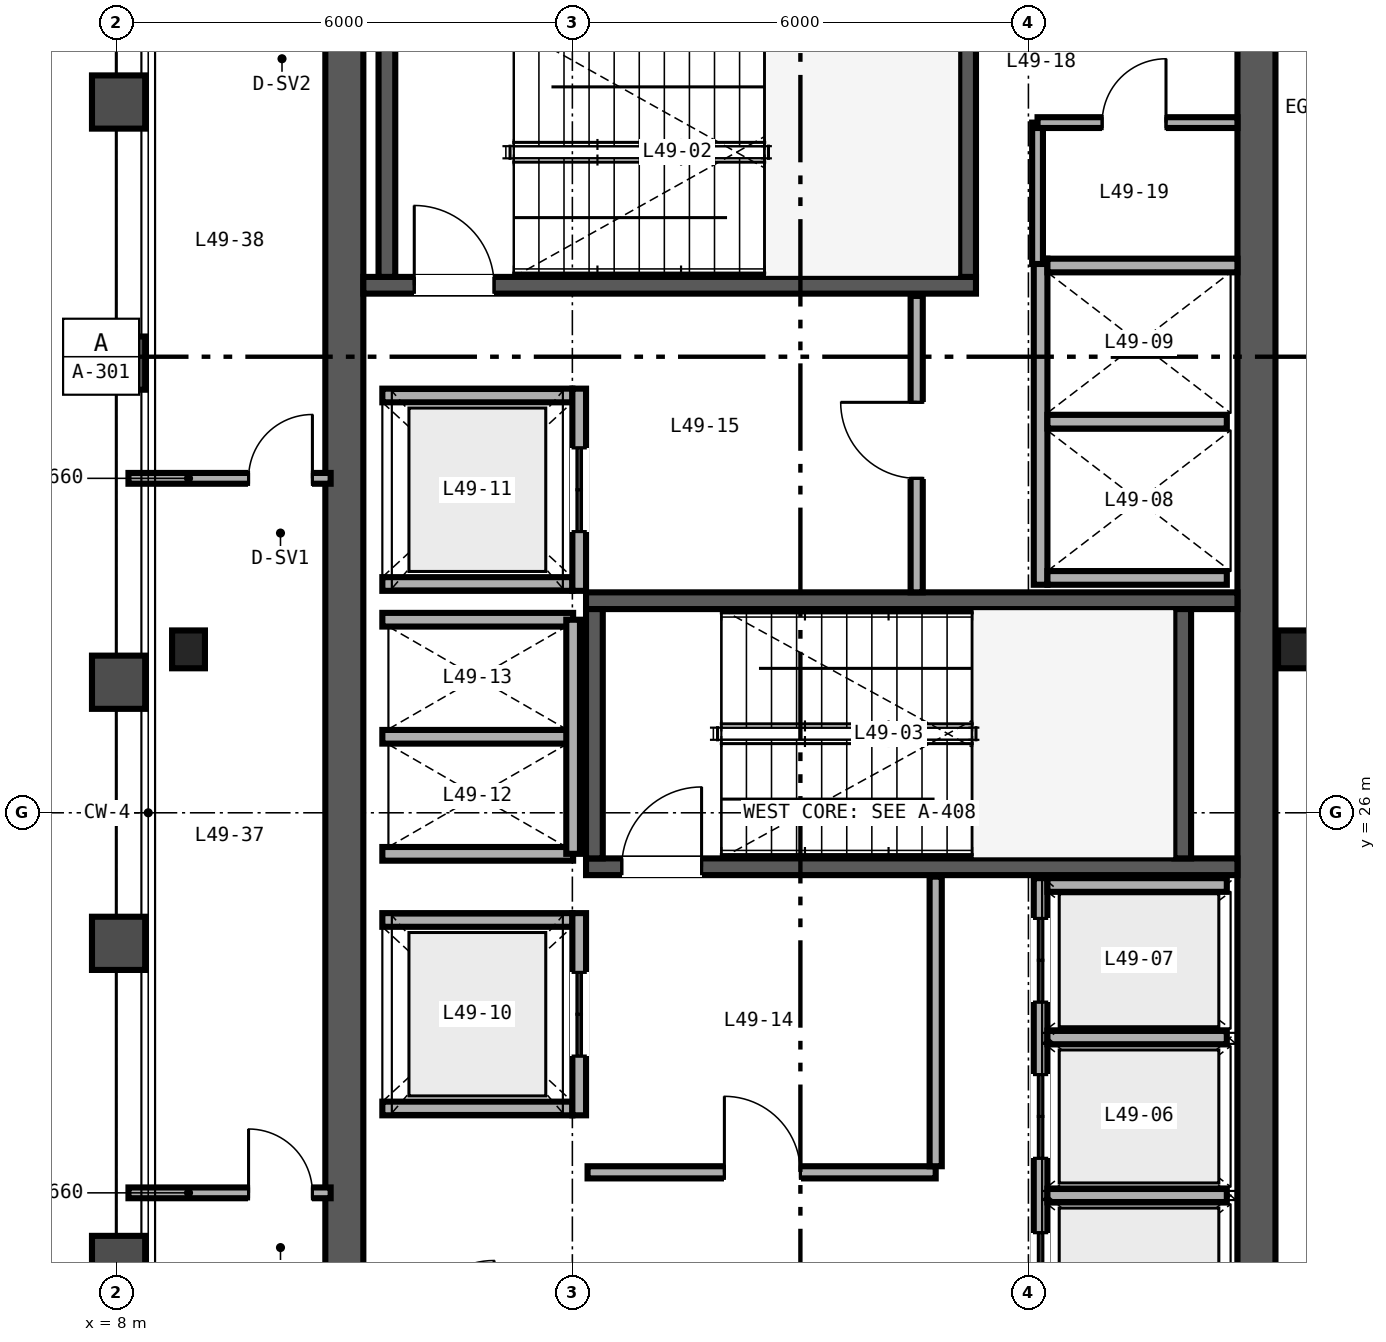
"""IFC4 building model, lengths in metres.
Left out: names, types, materials, properties, quantities, classifications, styles, units other than length and angle.
Written with IfcOpenShell. Run it as: python <this file> out.ifc"""

import sys

from ifc_helpers import new_model, si_unit, direction, frame, frame_2d, origin, origin_2d, place, context, subcontext, project, spatial, rectangle, i_section, extrude, source, transform, mapped, element, fill, save


model = new_model("IFC4")
c1 = context("Model", 3, precision=1e-05, world=origin(), true_north=direction((0.0, 1.0)))
c2 = subcontext(c1, "Body", "Model", "MODEL_VIEW")
j1 = project(units=[si_unit("LENGTHUNIT", "METRE"), si_unit("PLANEANGLEUNIT", "RADIAN")], contexts=[c1])
p1 = place(None, origin())
s1 = spatial("IfcSite", under=j1, at=p1, CompositionType="ELEMENT")
p2 = place(p1, origin())
s2 = spatial("IfcBuilding", under=s1, at=p2, CompositionType="ELEMENT")
p3 = place(p2, frame((0.0, 0.0, 195.6)))
s3 = spatial("IfcBuildingStorey", under=s2, at=p3, CompositionType="ELEMENT", Elevation=195.6)
for number, where, z_axis, x_axis in (
    (1, (11.0, 15.25, 0.0), (0.0, 0.0, 1.0), (0.0, 1.0, 0.0)),
    (2, (23.0, 15.25, 0.0), (0.0, 0.0, 1.0), (0.0, 1.0, 0.0)),
):
    element("IfcWall", number, at=place(p3, frame(where, z_axis=z_axis, x_axis=x_axis)), inside=s3, PredefinedType="SHEAR", context=c2, shape_type="SweptSolid", body=[
        extrude(rectangle(XDim=21.5, YDim=0.5, at=frame_2d((10.75, 0.0))), origin(), (0.0, 0.0, 1.0), 3.37),
    ])
p4 = place(p3, frame((11.25, 32.94, 0.0), z_axis=(0.0, 0.0, 1.0), x_axis=(1.0, 0.0, 0.0)))
e3 = element("IfcWall", 3, at=p4, inside=s3, PredefinedType="SHEAR", context=c2, shape_type="SweptSolid", body=[
    extrude(rectangle(XDim=8.06, YDim=0.22, at=frame_2d((4.03, 0.0))), origin(), (0.0, 0.0, 1.0), 3.4),
])
p5 = place(p4, frame((0.67, 0.0, 0.0)))
e4 = element("IfcOpeningElement", 4, at=p5, cuts=e3, PredefinedType="OPENING", context=c2, shape_type="SweptSolid", body=[
    extrude(rectangle(XDim=1.05, YDim=2.15, at=frame_2d((0.525, 1.075))), frame((0.0, 0.12, 0.0), z_axis=(0.0, -1.0, 0.0), x_axis=(1.0, 0.0, 0.0)), (0.0, 0.0, 1.0), 0.24),
])
for number, where, z_axis, x_axis in (
    (5, (11.56, 33.05, 0.0), (0.0, 0.0, 1.0), (0.0, 1.0, 0.0)),
    (6, (19.2, 33.05, 0.0), (0.0, 0.0, 1.0), (0.0, 1.0, 0.0)),
):
    element("IfcWall", number, at=place(p3, frame(where, z_axis=z_axis, x_axis=x_axis)), inside=s3, PredefinedType="SHEAR", context=c2, shape_type="SweptSolid", body=[
        extrude(rectangle(XDim=3.28, YDim=0.22, at=frame_2d((1.64, 0.0))), origin(), (0.0, 0.0, 1.0), 3.4),
    ])
p6 = place(p3, frame((14.18, 25.29, 0.0), z_axis=(0.0, 0.0, 1.0), x_axis=(1.0, 0.0, 0.0)))
e7 = element("IfcWall", 7, at=p6, inside=s3, PredefinedType="SHEAR", context=c2, shape_type="SweptSolid", body=[
    extrude(rectangle(XDim=8.57, YDim=0.22, at=frame_2d((4.285, 0.0))), origin(), (0.0, 0.0, 1.0), 3.4),
])
p7 = place(p6, frame((0.47, 0.0, 0.0)))
e8 = element("IfcOpeningElement", 8, at=p7, cuts=e7, PredefinedType="OPENING", context=c2, shape_type="SweptSolid", body=[
    extrude(rectangle(XDim=1.05, YDim=2.15, at=frame_2d((0.525, 1.075))), frame((0.0, 0.12, 0.0), z_axis=(0.0, -1.0, 0.0), x_axis=(1.0, 0.0, 0.0)), (0.0, 0.0, 1.0), 0.24),
])
p8 = place(p3, frame((14.18, 28.79, 0.0), z_axis=(0.0, 0.0, 1.0), x_axis=(1.0, 0.0, 0.0)))
e9 = element("IfcWall", 9, at=p8, inside=s3, PredefinedType="SHEAR", context=c2, shape_type="SweptSolid", body=[
    extrude(rectangle(XDim=8.57, YDim=0.22, at=frame_2d((4.285, 0.0))), origin(), (0.0, 0.0, 1.0), 3.4),
])
for number, where, z_axis, x_axis in (
    (10, (14.29, 25.4, 0.0), (0.0, 0.0, 1.0), (0.0, 1.0, 0.0)),
    (11, (22.03, 25.4, 0.0), (0.0, 0.0, 1.0), (0.0, 1.0, 0.0)),
):
    element("IfcWall", number, at=place(p3, frame(where, z_axis=z_axis, x_axis=x_axis)), inside=s3, PredefinedType="SHEAR", context=c2, shape_type="SweptSolid", body=[
        extrude(rectangle(XDim=3.28, YDim=0.22, at=frame_2d((1.64, 0.0))), origin(), (0.0, 0.0, 1.0), 3.4),
    ])
m1 = source(origin(), c2, "Body", "SweptSolid", [
    extrude(i_section(OverallWidth=0.432, OverallDepth=0.498, WebThickness=0.056, FlangeThickness=0.089, FilletRadius=0.025, at=origin_2d()), origin(), (0.0, 0.0, 1.0), 3.37),
])
for number, where, z_axis, x_axis in (
    (12, (8.95, 28.15, 0.0), (0.0, 0.0, 1.0), (1.0, 0.0, 0.0)),
    (13, (23.5, 28.15, 0.0), (0.0, 0.0, 1.0), (1.0, 0.0, 0.0)),
):
    element("IfcColumn", number, at=place(p3, frame(where, z_axis=z_axis, x_axis=x_axis)), inside=s3, PredefinedType="COLUMN", context=c2, shape_type="MappedRepresentation", body=[
        mapped(m1, transform((0.0, 0.0, 0.0), scale=1.0)),
    ])
p9 = place(p3, frame((20.16, 18.82, 0.0), z_axis=(0.0, 0.0, 1.0), x_axis=(0.0, 1.0, 0.0)))
e14 = element("IfcWall", 14, at=p9, inside=s3, PredefinedType="SOLIDWALL", context=c2, shape_type="SweptSolid", body=[
    extrude(rectangle(XDim=6.32, YDim=0.18, at=frame_2d((3.16, 0.0))), origin(), (0.0, 0.0, 1.0), 2.47),
])
p10 = place(p9, frame((0.555, 0.0, 0.0)))
e15 = element("IfcOpeningElement", 15, at=p10, cuts=e14, PredefinedType="OPENING", context=c2, shape_type="SweptSolid", body=[
    extrude(rectangle(XDim=1.1, YDim=2.2, at=frame_2d((0.55, 1.1))), frame((0.0, 0.1, 0.0), z_axis=(0.0, -1.0, 0.0), x_axis=(1.0, 0.0, 0.0)), (0.0, 0.0, 1.0), 0.2),
])
p11 = place(p9, frame((2.635, 0.0, 0.0)))
e16 = element("IfcOpeningElement", 16, at=p11, cuts=e14, PredefinedType="OPENING", context=c2, shape_type="SweptSolid", body=[
    extrude(rectangle(XDim=1.1, YDim=2.2, at=frame_2d((0.55, 1.1))), frame((0.0, 0.1, 0.0), z_axis=(0.0, -1.0, 0.0), x_axis=(1.0, 0.0, 0.0)), (0.0, 0.0, 1.0), 0.2),
])
p12 = place(p9, frame((4.69, 0.0, 0.0)))
e17 = element("IfcOpeningElement", 17, at=p12, cuts=e14, PredefinedType="OPENING", context=c2, shape_type="SweptSolid", body=[
    extrude(rectangle(XDim=1.1, YDim=2.2, at=frame_2d((0.55, 1.1))), frame((0.0, 0.1, 0.0), z_axis=(0.0, -1.0, 0.0), x_axis=(1.0, 0.0, 0.0)), (0.0, 0.0, 1.0), 0.2),
])
p13 = place(p3, frame((20.25, 25.05, 0.0), z_axis=(0.0, 0.0, 1.0), x_axis=(1.0, 0.0, 0.0)))
e18 = element("IfcWall", 18, at=p13, inside=s3, PredefinedType="SOLIDWALL", context=c2, shape_type="SweptSolid", body=[
    extrude(rectangle(XDim=2.36, YDim=0.18, at=frame_2d((1.18, 0.0))), origin(), (0.0, 0.0, 1.0), 3.37),
])
p14 = place(p3, frame((20.25, 20.965, 0.0), z_axis=(0.0, 0.0, 1.0), x_axis=(1.0, 0.0, 0.0)))
e19 = element("IfcWall", 19, at=p14, inside=s3, PredefinedType="SOLIDWALL", context=c2, shape_type="SweptSolid", body=[
    extrude(rectangle(XDim=2.36, YDim=0.18, at=frame_2d((1.18, 0.0))), origin(), (0.0, 0.0, 1.0), 2.47),
])
p15 = place(p3, frame((20.25, 23.045, 0.0), z_axis=(0.0, 0.0, 1.0), x_axis=(1.0, 0.0, 0.0)))
e20 = element("IfcWall", 20, at=p15, inside=s3, PredefinedType="SOLIDWALL", context=c2, shape_type="SweptSolid", body=[
    extrude(rectangle(XDim=2.36, YDim=0.18, at=frame_2d((1.18, 0.0))), origin(), (0.0, 0.0, 1.0), 3.37),
])
p16 = place(p3, frame((20.16, 29.0, 0.0), z_axis=(0.0, 0.0, 1.0), x_axis=(0.0, 1.0, 0.0)))
e21 = element("IfcWall", 21, at=p16, inside=s3, PredefinedType="SOLIDWALL", context=c2, shape_type="SweptSolid", body=[
    extrude(rectangle(XDim=4.29, YDim=0.18, at=frame_2d((2.145, 0.0))), origin(), (0.0, 0.0, 1.0), 3.37),
])
p17 = place(p3, frame((20.25, 29.09, 0.0), z_axis=(0.0, 0.0, 1.0), x_axis=(1.0, 0.0, 0.0)))
e22 = element("IfcWall", 22, at=p17, inside=s3, PredefinedType="SOLIDWALL", context=c2, shape_type="SweptSolid", body=[
    extrude(rectangle(XDim=2.36, YDim=0.18, at=frame_2d((1.18, 0.0))), origin(), (0.0, 0.0, 1.0), 3.37),
])
p18 = place(p3, frame((20.25, 33.2, 0.0), z_axis=(0.0, 0.0, 1.0), x_axis=(1.0, 0.0, 0.0)))
e23 = element("IfcWall", 23, at=p18, inside=s3, PredefinedType="SOLIDWALL", context=c2, shape_type="SweptSolid", body=[
    extrude(rectangle(XDim=2.5, YDim=0.18, at=frame_2d((1.25, 0.0))), origin(), (0.0, 0.0, 1.0), 3.37),
])
p19 = place(p3, frame((20.25, 31.145, 0.0), z_axis=(0.0, 0.0, 1.0), x_axis=(1.0, 0.0, 0.0)))
e24 = element("IfcWall", 24, at=p19, inside=s3, PredefinedType="SOLIDWALL", context=c2, shape_type="SweptSolid", body=[
    extrude(rectangle(XDim=2.36, YDim=0.18, at=frame_2d((1.18, 0.0))), origin(), (0.0, 0.0, 1.0), 3.37),
])
for number, where, z_axis, x_axis in (
    (25, (11.5, 22.11, 0.0), (0.0, 0.0, 1.0), (1.0, 0.0, 0.0)),
    (26, (11.5, 24.59, 0.0), (0.0, 0.0, 1.0), (1.0, 0.0, 0.0)),
):
    element("IfcWall", number, at=place(p3, frame(where, z_axis=z_axis, x_axis=x_axis)), inside=s3, PredefinedType="SOLIDWALL", context=c2, shape_type="SweptSolid", body=[
        extrude(rectangle(XDim=2.5, YDim=0.18, at=frame_2d((1.25, 0.0))), origin(), (0.0, 0.0, 1.0), 3.37),
    ])
p20 = place(p3, frame((14.09, 22.02, 0.0), z_axis=(0.0, 0.0, 1.0), x_axis=(0.0, 1.0, 0.0)))
e27 = element("IfcWall", 27, at=p20, inside=s3, PredefinedType="SOLIDWALL", context=c2, shape_type="SweptSolid", body=[
    extrude(rectangle(XDim=2.66, YDim=0.18, at=frame_2d((1.33, 0.0))), origin(), (0.0, 0.0, 1.0), 3.37),
])
p21 = place(p20, frame((0.78, 0.0, 0.0)))
e28 = element("IfcOpeningElement", 28, at=p21, cuts=e27, PredefinedType="OPENING", context=c2, shape_type="SweptSolid", body=[
    extrude(rectangle(XDim=1.1, YDim=2.2, at=frame_2d((0.55, 1.1))), frame((0.0, 0.1, 0.0), z_axis=(0.0, -1.0, 0.0), x_axis=(1.0, 0.0, 0.0)), (0.0, 0.0, 1.0), 0.2),
])
for number, where, z_axis, x_axis in (
    (29, (11.5, 29.01, 0.0), (0.0, 0.0, 1.0), (1.0, 0.0, 0.0)),
    (30, (11.5, 31.49, 0.0), (0.0, 0.0, 1.0), (1.0, 0.0, 0.0)),
):
    element("IfcWall", number, at=place(p3, frame(where, z_axis=z_axis, x_axis=x_axis)), inside=s3, PredefinedType="SOLIDWALL", context=c2, shape_type="SweptSolid", body=[
        extrude(rectangle(XDim=2.5, YDim=0.18, at=frame_2d((1.25, 0.0))), origin(), (0.0, 0.0, 1.0), 3.37),
    ])
p22 = place(p3, frame((14.09, 28.92, 0.0), z_axis=(0.0, 0.0, 1.0), x_axis=(0.0, 1.0, 0.0)))
e31 = element("IfcWall", 31, at=p22, inside=s3, PredefinedType="SOLIDWALL", context=c2, shape_type="SweptSolid", body=[
    extrude(rectangle(XDim=2.66, YDim=0.18, at=frame_2d((1.33, 0.0))), origin(), (0.0, 0.0, 1.0), 3.37),
])
p23 = place(p22, frame((0.78, 0.0, 0.0)))
e32 = element("IfcOpeningElement", 32, at=p23, cuts=e31, PredefinedType="OPENING", context=c2, shape_type="SweptSolid", body=[
    extrude(rectangle(XDim=1.1, YDim=2.2, at=frame_2d((0.55, 1.1))), frame((0.0, 0.1, 0.0), z_axis=(0.0, -1.0, 0.0), x_axis=(1.0, 0.0, 0.0)), (0.0, 0.0, 1.0), 0.2),
])
for number, where, z_axis, x_axis in (
    (33, (11.5, 25.46, 0.0), (0.0, 0.0, 1.0), (1.0, 0.0, 0.0)),
    (34, (11.5, 27.0, 0.0), (0.0, 0.0, 1.0), (1.0, 0.0, 0.0)),
    (35, (11.5, 28.54, 0.0), (0.0, 0.0, 1.0), (1.0, 0.0, 0.0)),
):
    element("IfcWall", number, at=place(p3, frame(where, z_axis=z_axis, x_axis=x_axis)), inside=s3, PredefinedType="SOLIDWALL", context=c2, shape_type="SweptSolid", body=[
        extrude(rectangle(XDim=2.51, YDim=0.18, at=frame_2d((1.255, 0.0))), origin(), (0.0, 0.0, 1.0), 3.37),
    ])
p24 = place(p3, frame((14.01, 25.46, 0.0), z_axis=(0.0, 0.0, 1.0), x_axis=(0.0, 1.0, 0.0)))
e36 = element("IfcWall", 36, at=p24, inside=s3, PredefinedType="SOLIDWALL", context=c2, shape_type="SweptSolid", body=[
    extrude(rectangle(XDim=3.08, YDim=0.18, at=frame_2d((1.54, 0.0))), origin(), (0.0, 0.0, 1.0), 3.37),
])
p25 = place(p3, frame((14.2, 21.27, 0.0), z_axis=(0.0, 0.0, 1.0), x_axis=(1.0, 0.0, 0.0)))
e37 = element("IfcWall", 37, at=p25, inside=s3, PredefinedType="PARTITIONING", context=c2, shape_type="SweptSolid", body=[
    extrude(rectangle(XDim=4.58, YDim=0.16, at=frame_2d((2.29, 0.0))), origin(), (0.0, 0.0, 1.0), 3.37),
])
p26 = place(p25, frame((1.8, 0.0, 0.0)))
e38 = element("IfcOpeningElement", 38, at=p26, cuts=e37, PredefinedType="OPENING", context=c2, shape_type="SweptSolid", body=[
    extrude(rectangle(XDim=1.0, YDim=2.15, at=frame_2d((0.5, 1.075))), frame((0.0, 0.09, 0.0), z_axis=(0.0, -1.0, 0.0), x_axis=(1.0, 0.0, 0.0)), (0.0, 0.0, 1.0), 0.18),
])
p27 = place(p3, frame((18.78, 21.35, 0.0), z_axis=(0.0, 0.0, 1.0), x_axis=(0.0, 1.0, 0.0)))
e39 = element("IfcWall", 39, at=p27, inside=s3, PredefinedType="PARTITIONING", context=c2, shape_type="SweptSolid", body=[
    extrude(rectangle(XDim=3.81, YDim=0.16, at=frame_2d((1.905, 0.0))), origin(), (0.0, 0.0, 1.0), 3.37),
])
p28 = place(p3, frame((18.53, 28.9, 0.0), z_axis=(0.0, 0.0, 1.0), x_axis=(0.0, 1.0, 0.0)))
e40 = element("IfcWall", 40, at=p28, inside=s3, PredefinedType="PARTITIONING", context=c2, shape_type="SweptSolid", body=[
    extrude(rectangle(XDim=3.9, YDim=0.16, at=frame_2d((1.95, 0.0))), origin(), (0.0, 0.0, 1.0), 3.37),
])
p29 = place(p28, frame((1.5, 0.0, 0.0)))
e41 = element("IfcOpeningElement", 41, at=p29, cuts=e40, PredefinedType="OPENING", context=c2, shape_type="SweptSolid", body=[
    extrude(rectangle(XDim=1.0, YDim=2.15, at=frame_2d((0.5, 1.075))), frame((0.0, 0.09, 0.0), z_axis=(0.0, -1.0, 0.0), x_axis=(1.0, 0.0, 0.0)), (0.0, 0.0, 1.0), 0.18),
])
p30 = place(p3, frame((20.12, 33.22, 0.0), z_axis=(0.0, 0.0, 1.0), x_axis=(0.0, 1.0, 0.0)))
e42 = element("IfcWall", 42, at=p30, inside=s3, PredefinedType="PARTITIONING", context=c2, shape_type="SweptSolid", body=[
    extrude(rectangle(XDim=1.86, YDim=0.142, at=frame_2d((0.93, 0.0))), origin(), (0.0, 0.0, 1.0), 3.37),
])
p31 = place(p3, frame((20.12, 35.08, 0.0), z_axis=(0.0, 0.0, 1.0), x_axis=(1.0, 0.0, 0.0)))
e43 = element("IfcWall", 43, at=p31, inside=s3, PredefinedType="PARTITIONING", context=c2, shape_type="SweptSolid", body=[
    extrude(rectangle(XDim=2.63, YDim=0.142, at=frame_2d((1.315, 0.0))), origin(), (0.0, 0.0, 1.0), 3.37),
])
p32 = place(p31, frame((0.85, 0.0, 0.0)))
e44 = element("IfcOpeningElement", 44, at=p32, cuts=e43, PredefinedType="OPENING", context=c2, shape_type="SweptSolid", body=[
    extrude(rectangle(XDim=0.84, YDim=2.1, at=frame_2d((0.42, 1.05))), frame((0.0, 0.081, 0.0), z_axis=(0.0, -1.0, 0.0), x_axis=(1.0, 0.0, 0.0)), (0.0, 0.0, 1.0), 0.162),
])
p33 = place(p3, frame((8.16, 21.0, 0.0), z_axis=(0.0, 0.0, 1.0), x_axis=(1.0, 0.0, 0.0)))
e45 = element("IfcWall", 45, at=p33, inside=s3, PredefinedType="PARTITIONING", context=c2, shape_type="SweptSolid", body=[
    extrude(rectangle(XDim=2.66, YDim=0.142, at=frame_2d((1.33, 0.0))), origin(), (0.0, 0.0, 1.0), 2.47),
])
p34 = place(p33, frame((1.58, 0.0, 0.0)))
e46 = element("IfcOpeningElement", 46, at=p34, cuts=e45, PredefinedType="OPENING", context=c2, shape_type="SweptSolid", body=[
    extrude(rectangle(XDim=0.84, YDim=2.1, at=frame_2d((0.42, 1.05))), frame((0.0, 0.081, 0.0), z_axis=(0.0, -1.0, 0.0), x_axis=(1.0, 0.0, 0.0)), (0.0, 0.0, 1.0), 0.162),
])
p35 = place(p3, frame((8.16, 30.4, 0.0), z_axis=(0.0, 0.0, 1.0), x_axis=(1.0, 0.0, 0.0)))
e47 = element("IfcWall", 47, at=p35, inside=s3, PredefinedType="PARTITIONING", context=c2, shape_type="SweptSolid", body=[
    extrude(rectangle(XDim=2.66, YDim=0.142, at=frame_2d((1.33, 0.0))), origin(), (0.0, 0.0, 1.0), 2.753),
])
p36 = place(p35, frame((1.58, 0.0, 0.0)))
e48 = element("IfcOpeningElement", 48, at=p36, cuts=e47, PredefinedType="OPENING", context=c2, shape_type="SweptSolid", body=[
    extrude(rectangle(XDim=0.84, YDim=2.1, at=frame_2d((0.42, 1.05))), frame((0.0, 0.081, 0.0), z_axis=(0.0, -1.0, 0.0), x_axis=(1.0, 0.0, 0.0)), (0.0, 0.0, 1.0), 0.162),
])
m2 = source(origin(), c2, "Body", "SweptSolid", [
    extrude(rectangle(XDim=1.05, YDim=2.15, at=frame_2d((0.525, 1.075))), frame((0.0, 0.025, 0.0), z_axis=(0.0, -1.0, 0.0), x_axis=(1.0, 0.0, 0.0)), (0.0, 0.0, 1.0), 0.05),
])
p37 = place(p5, origin())
e49 = element("IfcDoor", 49, at=p37, inside=s3, OperationType="SINGLE_SWING_LEFT", PredefinedType="DOOR", context=c2, shape_type="MappedRepresentation", body=[
    mapped(m2, transform((0.0, 0.0, 0.0), scale=1.0)),
])
fill(e4, e49)
p38 = place(p7, origin())
e50 = element("IfcDoor", 50, at=p38, inside=s3, OperationType="SINGLE_SWING_RIGHT", PredefinedType="DOOR", context=c2, shape_type="MappedRepresentation", body=[
    mapped(m2, transform((0.0, 0.0, 0.0), scale=1.0)),
])
fill(e8, e50)
m3 = source(origin(), c2, "Body", "SweptSolid", [
    extrude(rectangle(XDim=1.1, YDim=2.2, at=frame_2d((0.55, 1.1))), frame((0.0, 0.025, 0.0), z_axis=(0.0, -1.0, 0.0), x_axis=(1.0, 0.0, 0.0)), (0.0, 0.0, 1.0), 0.05),
])
p39 = place(p10, origin())
e51 = element("IfcDoor", 51, at=p39, inside=s3, OperationType="DOUBLE_DOOR_SLIDING", PredefinedType="DOOR", context=c2, shape_type="MappedRepresentation", body=[
    mapped(m3, transform((0.0, 0.0, 0.0), scale=1.0)),
])
fill(e15, e51)
p40 = place(p11, origin())
e52 = element("IfcDoor", 52, at=p40, inside=s3, OperationType="DOUBLE_DOOR_SLIDING", PredefinedType="DOOR", context=c2, shape_type="MappedRepresentation", body=[
    mapped(m3, transform((0.0, 0.0, 0.0), scale=1.0)),
])
fill(e16, e52)
p41 = place(p12, origin())
e53 = element("IfcDoor", 53, at=p41, inside=s3, OperationType="DOUBLE_DOOR_SLIDING", PredefinedType="DOOR", context=c2, shape_type="MappedRepresentation", body=[
    mapped(m3, transform((0.0, 0.0, 0.0), scale=1.0)),
])
fill(e17, e53)
p42 = place(p21, origin())
e54 = element("IfcDoor", 54, at=p42, inside=s3, OperationType="DOUBLE_DOOR_SLIDING", PredefinedType="DOOR", context=c2, shape_type="MappedRepresentation", body=[
    mapped(m3, transform((0.0, 0.0, 0.0), scale=1.0)),
])
fill(e28, e54)
p43 = place(p23, origin())
e55 = element("IfcDoor", 55, at=p43, inside=s3, OperationType="DOUBLE_DOOR_SLIDING", PredefinedType="DOOR", context=c2, shape_type="MappedRepresentation", body=[
    mapped(m3, transform((0.0, 0.0, 0.0), scale=1.0)),
])
fill(e32, e55)
m4 = source(origin(), c2, "Body", "SweptSolid", [
    extrude(rectangle(XDim=1.0, YDim=2.15, at=frame_2d((0.5, 1.075))), frame((0.0, 0.025, 0.0), z_axis=(0.0, -1.0, 0.0), x_axis=(1.0, 0.0, 0.0)), (0.0, 0.0, 1.0), 0.05),
])
p44 = place(p26, origin())
e56 = element("IfcDoor", 56, at=p44, inside=s3, OperationType="SINGLE_SWING_LEFT", PredefinedType="DOOR", context=c2, shape_type="MappedRepresentation", body=[
    mapped(m4, transform((0.0, 0.0, 0.0), scale=1.0)),
])
fill(e38, e56)
p45 = place(p29, origin())
e57 = element("IfcDoor", 57, at=p45, inside=s3, OperationType="SINGLE_SWING_RIGHT", PredefinedType="DOOR", context=c2, shape_type="MappedRepresentation", body=[
    mapped(m4, transform((0.0, 0.0, 0.0), scale=1.0)),
])
fill(e41, e57)
m5 = source(origin(), c2, "Body", "SweptSolid", [
    extrude(rectangle(XDim=0.84, YDim=2.1, at=frame_2d((0.42, 1.05))), frame((0.0, 0.025, 0.0), z_axis=(0.0, -1.0, 0.0), x_axis=(1.0, 0.0, 0.0)), (0.0, 0.0, 1.0), 0.05),
])
p46 = place(p32, origin())
e58 = element("IfcDoor", 58, at=p46, inside=s3, OperationType="SINGLE_SWING_RIGHT", PredefinedType="DOOR", context=c2, shape_type="MappedRepresentation", body=[
    mapped(m5, transform((0.0, 0.0, 0.0), scale=1.0)),
])
fill(e44, e58)
p47 = place(p34, origin())
e59 = element("IfcDoor", 59, at=p47, inside=s3, OperationType="SINGLE_SWING_LEFT", PredefinedType="DOOR", context=c2, shape_type="MappedRepresentation", body=[
    mapped(m5, transform((0.0, 0.0, 0.0), scale=1.0)),
])
fill(e46, e59)
p48 = place(p36, origin())
e60 = element("IfcDoor", 60, at=p48, inside=s3, OperationType="SINGLE_SWING_RIGHT", PredefinedType="DOOR", context=c2, shape_type="MappedRepresentation", body=[
    mapped(m5, transform((0.0, 0.0, 0.0), scale=1.0)),
])
fill(e48, e60)
save(model, sys.argv[1])
